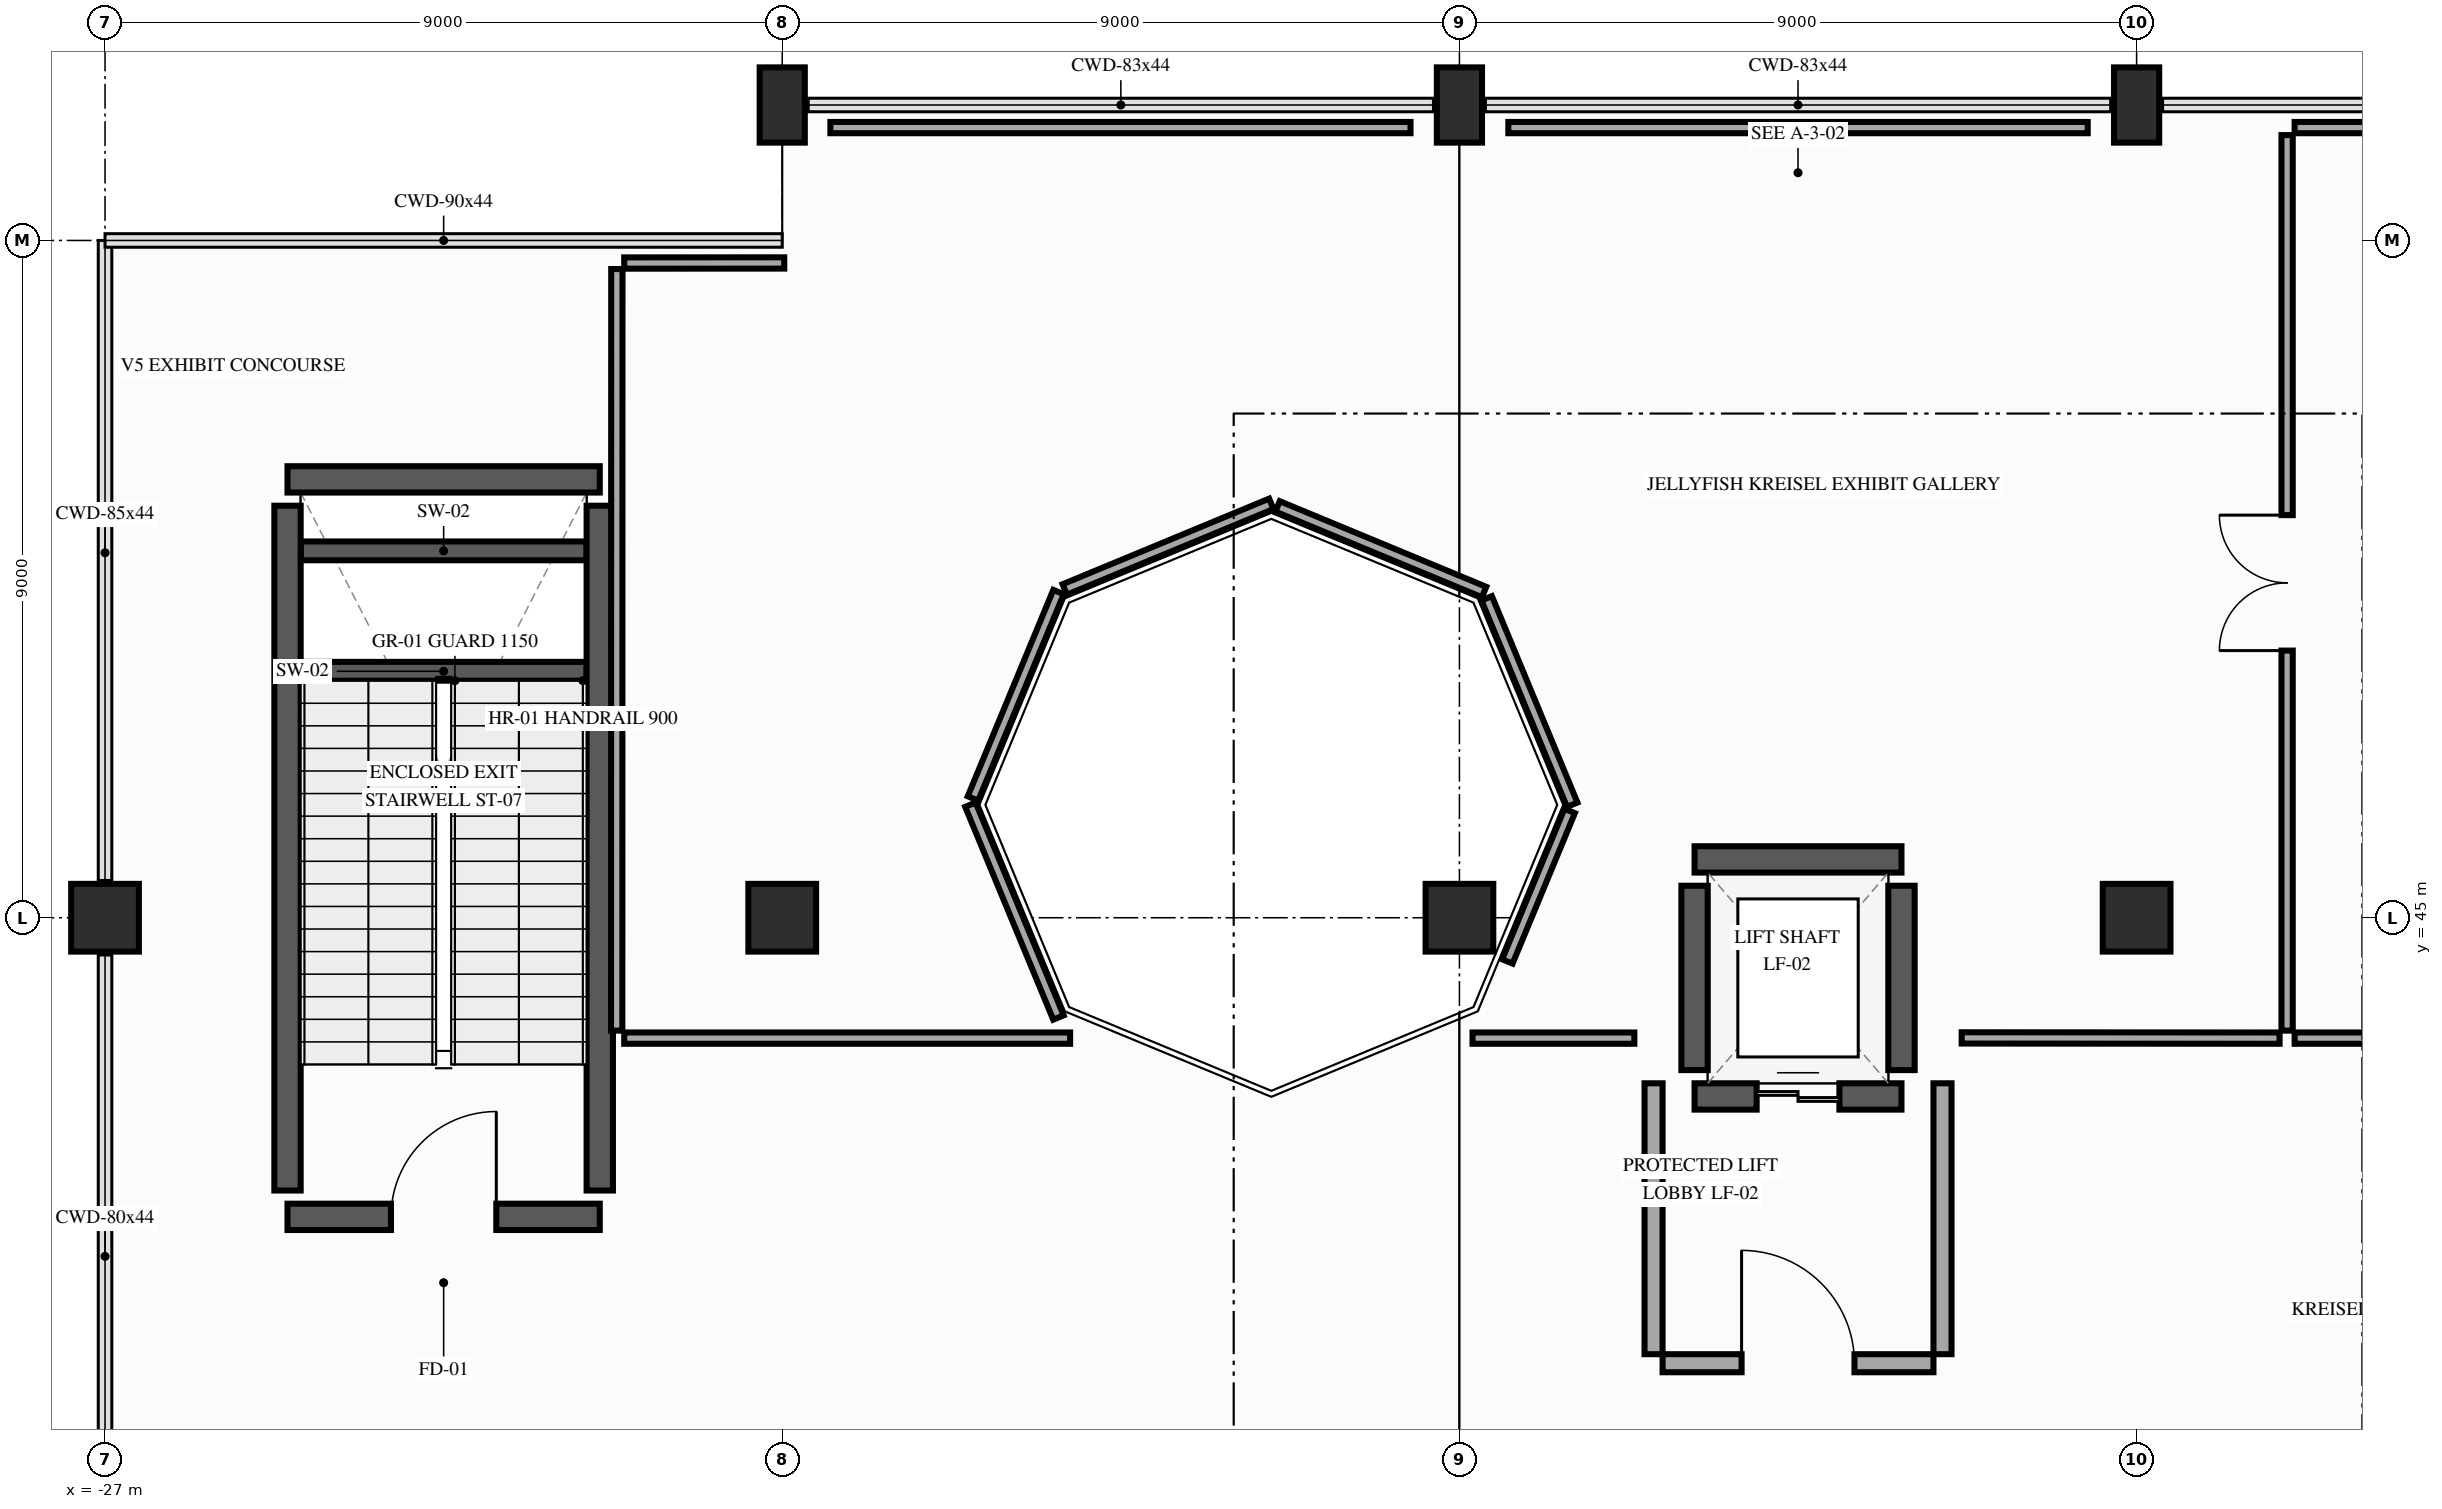
"""IFC4 building model, lengths in metres.
Left out: names, types, materials, properties, quantities, classifications, styles, units other than length and angle.
Written with IfcOpenShell. Run it as: python <this file> out.ifc"""

import sys

from ifc_helpers import new_model, si_unit, direction, frame, frame_2d, origin, origin_2d, place, context, subcontext, project, spatial, rectangle, extrude, element, fill, save


model = new_model("IFC4")
c1 = context("Model", 3, precision=1e-05, world=origin(), true_north=direction((0.0, 1.0)))
c2 = subcontext(c1, "Body", "Model", "MODEL_VIEW")
j1 = project(units=[si_unit("LENGTHUNIT", "METRE"), si_unit("PLANEANGLEUNIT", "RADIAN")], contexts=[c1])
p1 = place(None, origin())
s1 = spatial("IfcSite", under=j1, at=p1, CompositionType="ELEMENT")
p2 = place(p1, origin())
s2 = spatial("IfcBuilding", under=s1, at=p2, CompositionType="ELEMENT")
p3 = place(p2, frame((0.0, 0.0, 10.8)))
s3 = spatial("IfcBuildingStorey", under=s2, at=p3, CompositionType="ELEMENT", Elevation=10.8)
for number, where, z_axis, x_axis in (
    (1, (-27.0, 45.0, 0.0), (0.0, 0.0, 1.0), (1.0, 0.0, 0.0)),
    (2, (-18.0, 45.0, 0.0), (0.0, 0.0, 1.0), (1.0, 0.0, 0.0)),
):
    element("IfcColumn", number, at=place(p3, frame(where, z_axis=z_axis, x_axis=x_axis)), inside=s3, PredefinedType="COLUMN", context=c2, shape_type="SweptSolid", body=[
        extrude(rectangle(XDim=0.9, YDim=0.9, at=origin_2d()), origin(), (0.0, 0.0, 1.0), 5.4),
    ])
p4 = place(p3, frame((-18.0, 55.8, 0.0), z_axis=(0.0, 0.0, 1.0), x_axis=(1.0, 0.0, 0.0)))
e3 = element("IfcColumn", 3, at=p4, inside=s3, PredefinedType="PILASTER", context=c2, shape_type="SweptSolid", body=[
    extrude(rectangle(XDim=0.6, YDim=1.0, at=origin_2d()), origin(), (0.0, 0.0, 1.0), 5.4),
])
p5 = place(p3, frame((-9.0, 45.0, 0.0), z_axis=(0.0, 0.0, 1.0), x_axis=(1.0, 0.0, 0.0)))
e4 = element("IfcColumn", 4, at=p5, inside=s3, PredefinedType="COLUMN", context=c2, shape_type="SweptSolid", body=[
    extrude(rectangle(XDim=0.9, YDim=0.9, at=origin_2d()), origin(), (0.0, 0.0, 1.0), 5.4),
])
p6 = place(p3, frame((-9.0, 55.8, 0.0), z_axis=(0.0, 0.0, 1.0), x_axis=(1.0, 0.0, 0.0)))
e5 = element("IfcColumn", 5, at=p6, inside=s3, PredefinedType="PILASTER", context=c2, shape_type="SweptSolid", body=[
    extrude(rectangle(XDim=0.6, YDim=1.0, at=origin_2d()), origin(), (0.0, 0.0, 1.0), 5.4),
])
p7 = place(p3, frame((0.0, 45.0, 0.0), z_axis=(0.0, 0.0, 1.0), x_axis=(1.0, 0.0, 0.0)))
e6 = element("IfcColumn", 6, at=p7, inside=s3, PredefinedType="COLUMN", context=c2, shape_type="SweptSolid", body=[
    extrude(rectangle(XDim=0.9, YDim=0.9, at=origin_2d()), origin(), (0.0, 0.0, 1.0), 5.4),
])
p8 = place(p3, frame((0.0, 55.8, 0.0), z_axis=(0.0, 0.0, 1.0), x_axis=(1.0, 0.0, 0.0)))
e7 = element("IfcColumn", 7, at=p8, inside=s3, PredefinedType="PILASTER", context=c2, shape_type="SweptSolid", body=[
    extrude(rectangle(XDim=0.6, YDim=1.0, at=origin_2d()), origin(), (0.0, 0.0, 1.0), 5.4),
])
for number, where, z_axis, x_axis in (
    (8, (-24.4, 48.275, 0.0), (0.0, 0.0, 1.0), (1.0, 0.0, 0.0)),
    (9, (-24.4, 49.875, 0.0), (0.0, 0.0, 1.0), (1.0, 0.0, 0.0)),
):
    element("IfcWall", number, at=place(p3, frame(where, z_axis=z_axis, x_axis=x_axis)), inside=s3, PredefinedType="SHEAR", context=c2, shape_type="SweptSolid", body=[
        extrude(rectangle(XDim=3.8, YDim=0.25, at=frame_2d((1.9, 0.0))), origin(), (0.0, 0.0, 1.0), 2.5),
    ])
p9 = place(p3, frame((-24.575, 41.025, 0.0), z_axis=(0.0, 0.0, 1.0), x_axis=(1.0, 0.0, 0.0)))
e10 = element("IfcWall", 10, at=p9, inside=s3, PredefinedType="SHEAR", context=c2, shape_type="SweptSolid", body=[
    extrude(rectangle(XDim=4.15, YDim=0.35, at=frame_2d((2.075, 0.0))), origin(), (0.0, 0.0, 1.0), 5.16),
])
p10 = place(p9, frame((1.375, 0.0, 0.0)))
e11 = element("IfcOpeningElement", 11, at=p10, cuts=e10, PredefinedType="OPENING", context=c2, shape_type="SweptSolid", body=[
    extrude(rectangle(XDim=1.4, YDim=2.2, at=frame_2d((0.7, 1.1))), frame((0.0, 0.185, 0.0), z_axis=(0.0, -1.0, 0.0), x_axis=(1.0, 0.0, 0.0)), (0.0, 0.0, 1.0), 0.37),
])
p11 = place(p3, frame((-24.575, 50.825, 0.0), z_axis=(0.0, 0.0, 1.0), x_axis=(1.0, 0.0, 0.0)))
e12 = element("IfcWall", 12, at=p11, inside=s3, PredefinedType="SHEAR", context=c2, shape_type="SweptSolid", body=[
    extrude(rectangle(XDim=4.15, YDim=0.35, at=frame_2d((2.075, 0.0))), origin(), (0.0, 0.0, 1.0), 5.16),
])
for number, where, z_axis, x_axis in (
    (13, (-24.575, 41.375, 0.0), (0.0, 0.0, 1.0), (0.0, 1.0, 0.0)),
    (14, (-20.425, 41.375, 0.0), (0.0, 0.0, 1.0), (0.0, 1.0, 0.0)),
):
    element("IfcWall", number, at=place(p3, frame(where, z_axis=z_axis, x_axis=x_axis)), inside=s3, PredefinedType="SHEAR", context=c2, shape_type="SweptSolid", body=[
        extrude(rectangle(XDim=9.1, YDim=0.35, at=frame_2d((4.55, 0.0))), origin(), (0.0, 0.0, 1.0), 5.16),
    ])
p12 = place(p3, frame((-5.875, 42.625, 0.0), z_axis=(0.0, 0.0, 1.0), x_axis=(1.0, 0.0, 0.0)))
e15 = element("IfcWall", 15, at=p12, inside=s3, PredefinedType="SHEAR", context=c2, shape_type="SweptSolid", body=[
    extrude(rectangle(XDim=2.75, YDim=0.35, at=frame_2d((1.375, 0.0))), origin(), (0.0, 0.0, 1.0), 5.16),
])
p13 = place(p12, frame((0.825, 0.0, 0.0)))
e16 = element("IfcOpeningElement", 16, at=p13, cuts=e15, PredefinedType="OPENING", context=c2, shape_type="SweptSolid", body=[
    extrude(rectangle(XDim=1.1, YDim=2.2, at=frame_2d((0.55, 1.1))), frame((0.0, 0.185, 0.0), z_axis=(0.0, -1.0, 0.0), x_axis=(1.0, 0.0, 0.0)), (0.0, 0.0, 1.0), 0.37),
])
p14 = place(p3, frame((-3.125, 45.775, 0.0), z_axis=(0.0, 0.0, 1.0), x_axis=(-1.0, 0.0, 0.0)))
e17 = element("IfcWall", 17, at=p14, inside=s3, PredefinedType="SHEAR", context=c2, shape_type="SweptSolid", body=[
    extrude(rectangle(XDim=2.75, YDim=0.35, at=frame_2d((1.375, 0.0))), origin(), (0.0, 0.0, 1.0), 5.16),
])
for number, where, z_axis, x_axis in (
    (18, (-5.875, 42.975, 0.0), (0.0, 0.0, 1.0), (0.0, 1.0, 0.0)),
    (19, (-3.125, 42.975, 0.0), (0.0, 0.0, 1.0), (0.0, 1.0, 0.0)),
):
    element("IfcWall", number, at=place(p3, frame(where, z_axis=z_axis, x_axis=x_axis)), inside=s3, PredefinedType="SHEAR", context=c2, shape_type="SweptSolid", body=[
        extrude(rectangle(XDim=2.45, YDim=0.35, at=frame_2d((1.225, 0.0))), origin(), (0.0, 0.0, 1.0), 5.16),
    ])
p15 = place(p3, frame((-6.3, 39.08, 0.0), z_axis=(0.0, 0.0, 1.0), x_axis=(1.0, 0.0, 0.0)))
e20 = element("IfcWall", 20, at=p15, inside=s3, PredefinedType="PARTITIONING", context=c2, shape_type="SweptSolid", body=[
    extrude(rectangle(XDim=3.6, YDim=0.24, at=frame_2d((1.8, 0.0))), origin(), (0.0, 0.0, 1.0), 4.845),
])
p16 = place(p15, frame((1.05, 0.0, 0.0)))
e21 = element("IfcOpeningElement", 21, at=p16, cuts=e20, PredefinedType="OPENING", context=c2, shape_type="SweptSolid", body=[
    extrude(rectangle(XDim=1.5, YDim=2.2, at=frame_2d((0.75, 1.1))), frame((0.0, 0.13, 0.0), z_axis=(0.0, -1.0, 0.0), x_axis=(1.0, 0.0, 0.0)), (0.0, 0.0, 1.0), 0.26),
])
for number, where, z_axis, x_axis in (
    (22, (-6.42, 39.2, 0.0), (0.0, 0.0, 1.0), (0.0, 1.0, 0.0)),
    (23, (-2.58, 39.2, 0.0), (0.0, 0.0, 1.0), (0.0, 1.0, 0.0)),
):
    element("IfcWall", number, at=place(p3, frame(where, z_axis=z_axis, x_axis=x_axis)), inside=s3, PredefinedType="PARTITIONING", context=c2, shape_type="SweptSolid", body=[
        extrude(rectangle(XDim=3.6, YDim=0.24, at=frame_2d((1.8, 0.0))), origin(), (0.0, 0.0, 1.0), 4.645),
    ])
p17 = place(p3, frame((-20.198, 53.62, 0.0), z_axis=(0.0, 0.0, 1.0), x_axis=(-0.000192994303, -0.999999981377, 0.0)))
e24 = element("IfcWall", 24, at=p17, inside=s3, PredefinedType="PARTITIONING", context=c2, shape_type="SweptSolid", body=[
    extrude(rectangle(XDim=10.12, YDim=0.15, at=frame_2d((5.06, 0.0))), origin(), (0.0, 0.0, 1.0), 5.05),
])
p18 = place(p3, frame((-20.1, 43.4, 0.0), z_axis=(0.0, 0.0, 1.0), x_axis=(1.0, 0.0, 0.0)))
e25 = element("IfcWall", 25, at=p18, inside=s3, PredefinedType="PARTITIONING", context=c2, shape_type="SweptSolid", body=[
    extrude(rectangle(XDim=5.926, YDim=0.15, at=frame_2d((2.963, 0.0))), origin(), (0.0, 0.0, 1.0), 4.445),
])
p19 = place(p3, frame((-14.329, 43.674, 0.0), z_axis=(0.0, 0.0, 1.0), x_axis=(-0.382286027274, 0.924044042971, 0.0)))
e26 = element("IfcWall", 26, at=p19, inside=s3, PredefinedType="PARTITIONING", context=c2, shape_type="SweptSolid", body=[
    extrude(rectangle(XDim=3.06, YDim=0.15, at=frame_2d((1.53, 0.0))), origin(), (0.0, 0.0, 1.0), 4.395),
])
p20 = place(p3, frame((-15.465, 46.585, 0.0), z_axis=(0.0, 0.0, 1.0), x_axis=(0.382985932097, 0.923754174992, 0.0)))
e27 = element("IfcWall", 27, at=p20, inside=s3, PredefinedType="PARTITIONING", context=c2, shape_type="SweptSolid", body=[
    extrude(rectangle(XDim=2.969, YDim=0.15, at=frame_2d((1.485, 0.0))), origin(), (0.0, 0.0, 1.0), 4.745),
])
p21 = place(p3, frame((-14.245, 49.362, 0.0), z_axis=(0.0, 0.0, 1.0), x_axis=(0.923775431697, 0.382934657341, 0.0)))
e28 = element("IfcWall", 28, at=p21, inside=s3, PredefinedType="PARTITIONING", context=c2, shape_type="SweptSolid", body=[
    extrude(rectangle(XDim=2.972, YDim=0.15, at=frame_2d((1.486, 0.0))), origin(), (0.0, 0.0, 1.0), 5.05),
])
p22 = place(p3, frame((-11.417, 50.466, 0.0), z_axis=(0.0, 0.0, 1.0), x_axis=(0.923734314356, -0.383033832031, 0.0)))
e29 = element("IfcWall", 29, at=p22, inside=s3, PredefinedType="PARTITIONING", context=c2, shape_type="SweptSolid", body=[
    extrude(rectangle(XDim=2.971, YDim=0.15, at=frame_2d((1.486, 0.0))), origin(), (0.0, 0.0, 1.0), 4.445),
])
p23 = place(p3, frame((-8.638, 49.245, 0.0), z_axis=(0.0, 0.0, 1.0), x_axis=(0.382886684653, -0.923795316461, 0.0)))
e30 = element("IfcWall", 30, at=p23, inside=s3, PredefinedType="PARTITIONING", context=c2, shape_type="SweptSolid", body=[
    extrude(rectangle(XDim=2.969, YDim=0.15, at=frame_2d((1.485, 0.0))), origin(), (0.0, 0.0, 1.0), 4.445),
])
p24 = place(p3, frame((-7.535, 46.419, 0.0), z_axis=(0.0, 0.0, 1.0), x_axis=(-0.382564297979, -0.923928870591, 0.0)))
e31 = element("IfcWall", 31, at=p24, inside=s3, PredefinedType="PARTITIONING", context=c2, shape_type="SweptSolid", body=[
    extrude(rectangle(XDim=2.165, YDim=0.15, at=frame_2d((1.082, 0.0))), origin(), (0.0, 0.0, 1.0), 5.05),
])
p25 = place(p3, frame((-8.826, 43.4, 0.0), z_axis=(0.0, 0.0, 1.0), x_axis=(1.0, 0.0, 0.0)))
e32 = element("IfcWall", 32, at=p25, inside=s3, PredefinedType="PARTITIONING", context=c2, shape_type="SweptSolid", body=[
    extrude(rectangle(XDim=2.151, YDim=0.15, at=frame_2d((1.075, 0.0))), origin(), (0.0, 0.0, 1.0), 4.445),
])
p26 = place(p3, frame((-2.325, 43.403, 0.0), z_axis=(0.0, 0.0, 1.0), x_axis=(0.999999717828, -0.000751227757, 0.0)))
e33 = element("IfcWall", 33, at=p26, inside=s3, PredefinedType="PARTITIONING", context=c2, shape_type="SweptSolid", body=[
    extrude(rectangle(XDim=4.225, YDim=0.15, at=frame_2d((2.112, 0.0))), origin(), (0.0, 0.0, 1.0), 4.445),
])
p27 = place(p3, frame((2.0, 43.5, 0.0), z_axis=(0.0, 0.0, 1.0), x_axis=(0.0, 1.0, 0.0)))
e34 = element("IfcWall", 34, at=p27, inside=s3, PredefinedType="PARTITIONING", context=c2, shape_type="SweptSolid", body=[
    extrude(rectangle(XDim=11.9, YDim=0.15, at=frame_2d((5.95, 0.0))), origin(), (0.0, 0.0, 1.0), 4.395),
])
p28 = place(p27, frame((5.05, 0.0, 0.0)))
e35 = element("IfcOpeningElement", 35, at=p28, cuts=e34, PredefinedType="OPENING", context=c2, shape_type="SweptSolid", body=[
    extrude(rectangle(XDim=1.8, YDim=2.3, at=frame_2d((0.9, 1.15))), frame((0.0, 0.085, 0.0), z_axis=(0.0, -1.0, 0.0), x_axis=(1.0, 0.0, 0.0)), (0.0, 0.0, 1.0), 0.17),
])
p29 = place(p3, frame((-0.65, 55.5, 0.0), z_axis=(0.0, 0.0, 1.0), x_axis=(-1.0, 0.0, 0.0)))
e36 = element("IfcWall", 36, at=p29, inside=s3, PredefinedType="PARTITIONING", context=c2, shape_type="SweptSolid", body=[
    extrude(rectangle(XDim=7.7, YDim=0.15, at=frame_2d((3.85, 0.0))), origin(), (0.0, 0.0, 1.0), 4.395),
])
p30 = place(p3, frame((-9.65, 55.5, 0.0), z_axis=(0.0, 0.0, 1.0), x_axis=(-1.0, 0.0, 0.0)))
e37 = element("IfcWall", 37, at=p30, inside=s3, PredefinedType="PARTITIONING", context=c2, shape_type="SweptSolid", body=[
    extrude(rectangle(XDim=7.71, YDim=0.15, at=frame_2d((3.855, 0.0))), origin(), (0.0, 0.0, 1.0), 4.395),
])
p31 = place(p3, frame((-17.973, 53.701, 0.0), z_axis=(0.0, 0.0, 1.0), x_axis=(-0.999999894621, -0.000459084079, 0.0)))
e38 = element("IfcWall", 38, at=p31, inside=s3, PredefinedType="PARTITIONING", context=c2, shape_type="SweptSolid", body=[
    extrude(rectangle(XDim=2.127, YDim=0.15, at=frame_2d((1.063, 0.0))), origin(), (0.0, 0.0, 1.0), 4.445),
])
p32 = place(p3, frame((8.35, 55.5, 0.0), z_axis=(0.0, 0.0, 1.0), x_axis=(-1.0, 0.0, 0.0)))
e39 = element("IfcWall", 39, at=p32, inside=s3, PredefinedType="PARTITIONING", context=c2, shape_type="SweptSolid", body=[
    extrude(rectangle(XDim=6.25, YDim=0.15, at=frame_2d((3.125, 0.0))), origin(), (0.0, 0.0, 1.0), 4.395),
])
p33 = place(p3, frame((2.1, 43.4, 0.0), z_axis=(0.0, 0.0, 1.0), x_axis=(1.0, 0.0, 0.0)))
e40 = element("IfcWall", 40, at=p33, inside=s3, PredefinedType="PARTITIONING", context=c2, shape_type="SweptSolid", body=[
    extrude(rectangle(XDim=9.0, YDim=0.15, at=frame_2d((4.5, 0.0))), origin(), (0.0, 0.0, 1.0), 4.445),
])
p34 = place(p10, origin())
e41 = element("IfcDoor", 41, at=p34, inside=s3, OperationType="SINGLE_SWING_RIGHT", PredefinedType="DOOR", context=c2, shape_type="SweptSolid", body=[
    extrude(rectangle(XDim=1.4, YDim=2.2, at=frame_2d((0.7, 1.1))), frame((0.0, 0.025, 0.0), z_axis=(0.0, -1.0, 0.0), x_axis=(1.0, 0.0, 0.0)), (0.0, 0.0, 1.0), 0.05),
])
fill(e11, e41)
p35 = place(p13, origin())
e42 = element("IfcDoor", 42, at=p35, inside=s3, OperationType="DOUBLE_DOOR_SLIDING", PredefinedType="DOOR", context=c2, shape_type="SweptSolid", body=[
    extrude(rectangle(XDim=1.1, YDim=2.2, at=frame_2d((0.55, 1.1))), frame((0.0, 0.025, 0.0), z_axis=(0.0, -1.0, 0.0), x_axis=(1.0, 0.0, 0.0)), (0.0, 0.0, 1.0), 0.05),
])
fill(e16, e42)
p36 = place(p16, origin())
e43 = element("IfcDoor", 43, at=p36, inside=s3, OperationType="SINGLE_SWING_LEFT", PredefinedType="DOOR", context=c2, shape_type="SweptSolid", body=[
    extrude(rectangle(XDim=1.5, YDim=2.2, at=frame_2d((0.75, 1.1))), frame((0.0, 0.025, 0.0), z_axis=(0.0, -1.0, 0.0), x_axis=(1.0, 0.0, 0.0)), (0.0, 0.0, 1.0), 0.05),
])
fill(e21, e43)
p37 = place(p28, origin())
e44 = element("IfcDoor", 44, at=p37, inside=s3, OperationType="DOUBLE_DOOR_SINGLE_SWING", PredefinedType="DOOR", context=c2, shape_type="SweptSolid", body=[
    extrude(rectangle(XDim=1.8, YDim=2.3, at=frame_2d((0.9, 1.15))), frame((0.0, 0.025, 0.0), z_axis=(0.0, -1.0, 0.0), x_axis=(1.0, 0.0, 0.0)), (0.0, 0.0, 1.0), 0.05),
])
fill(e35, e44)
save(model, sys.argv[1])
